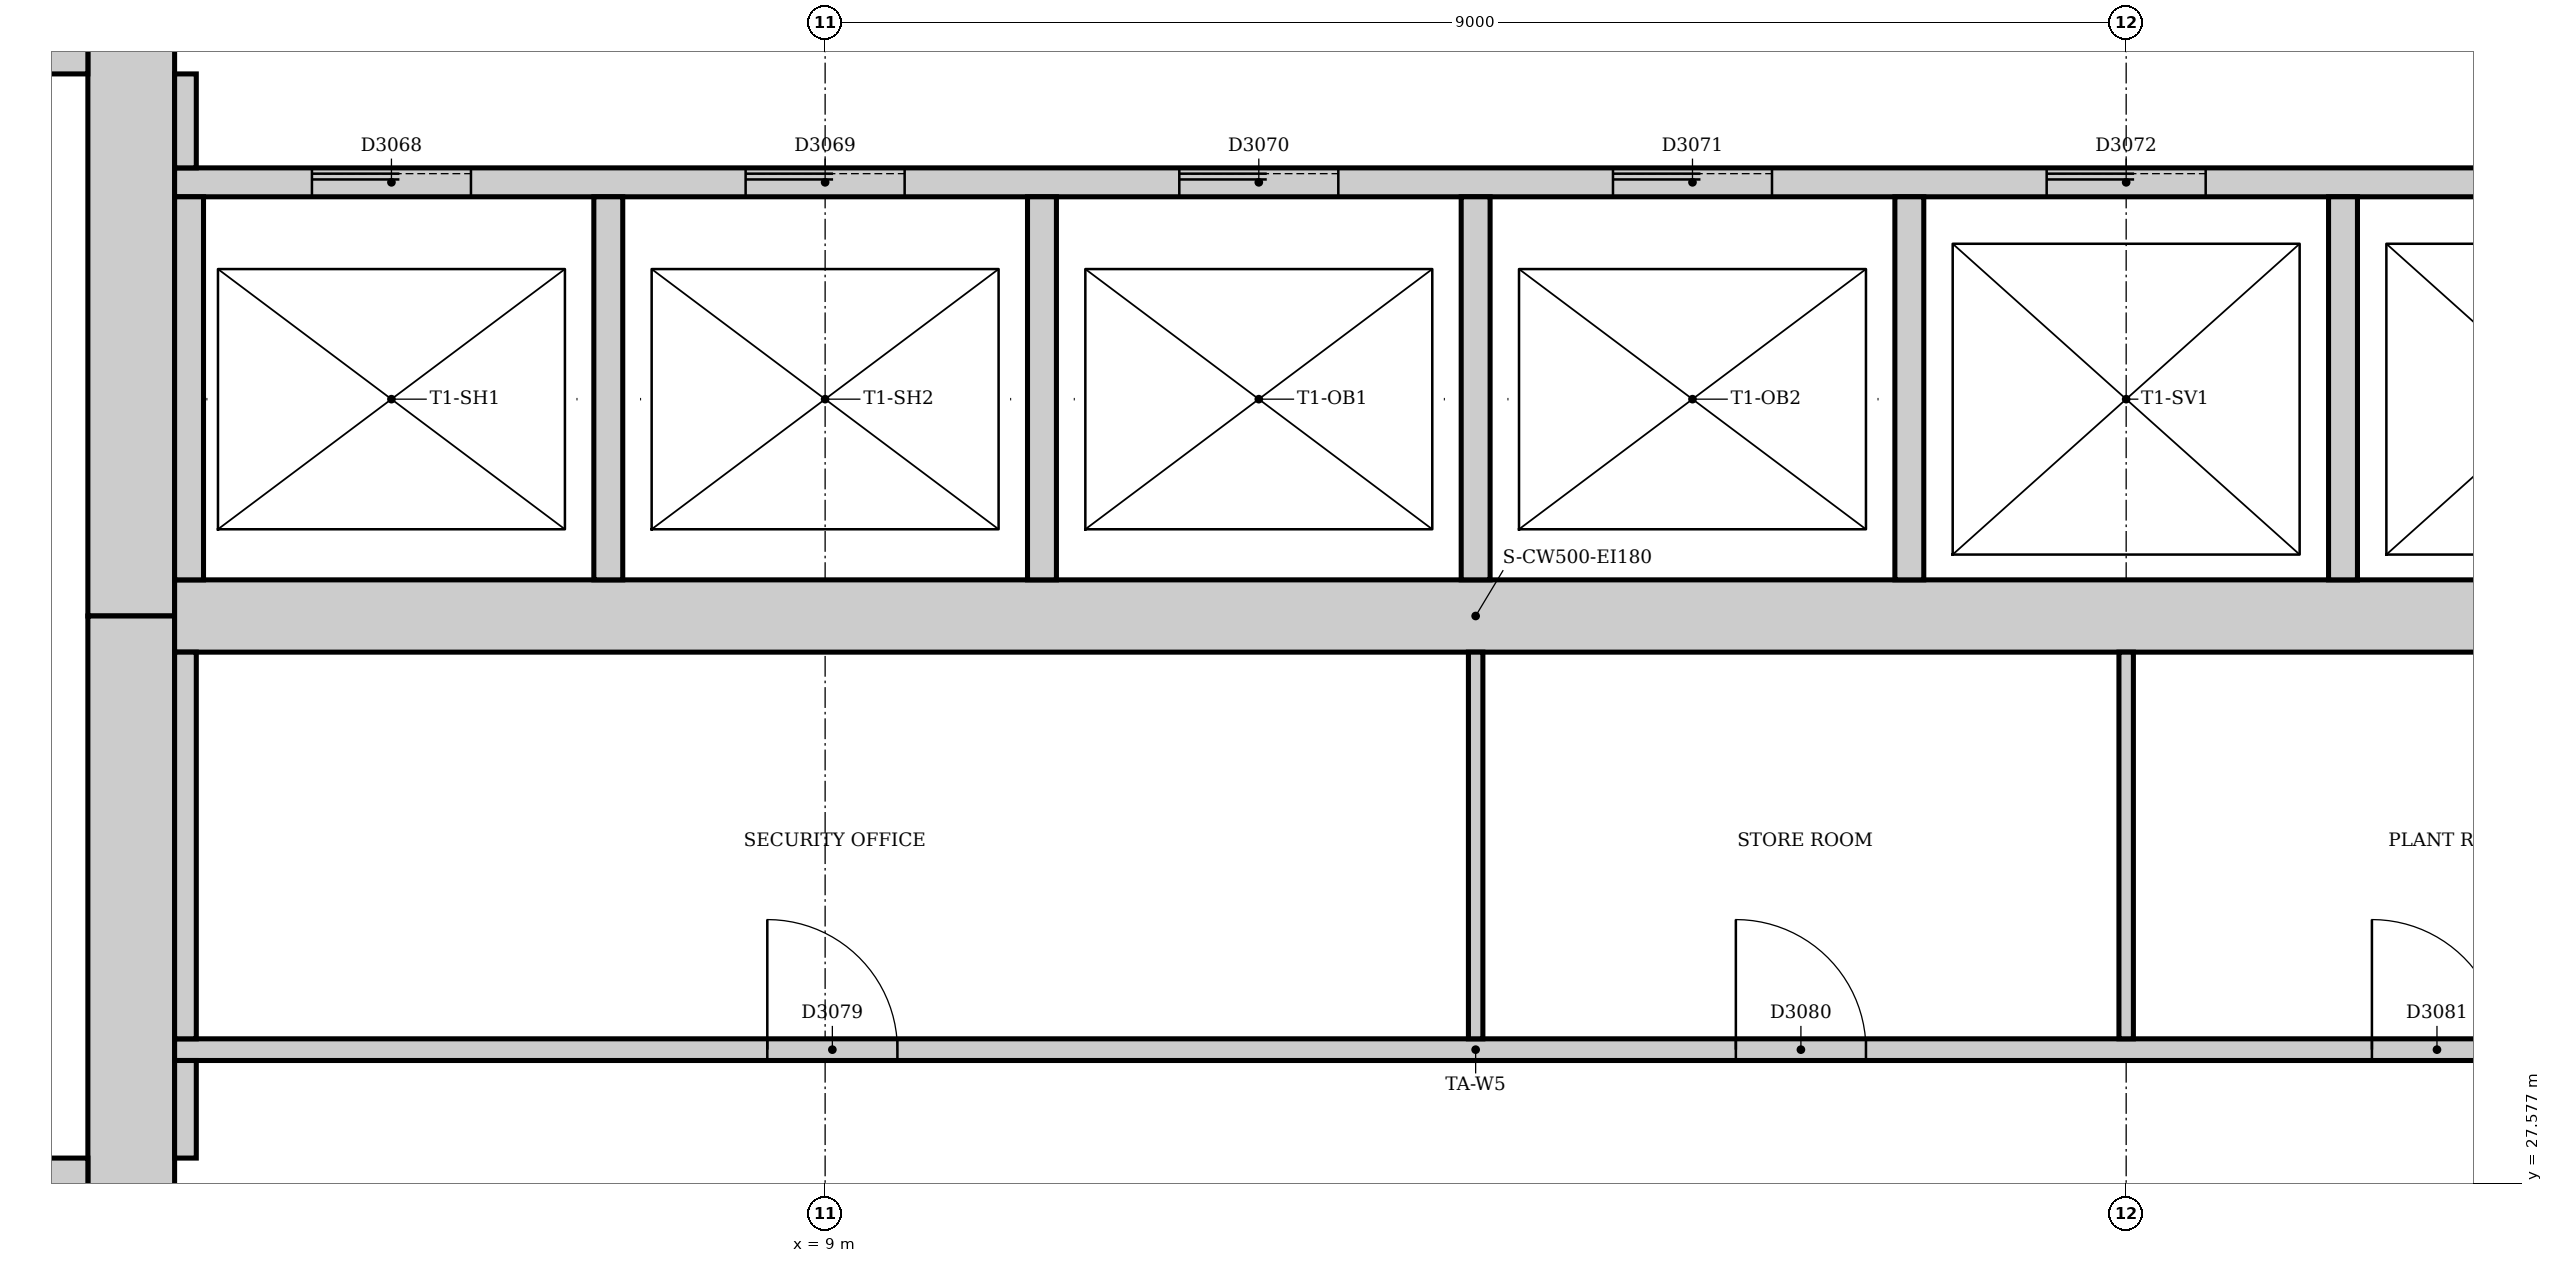
"""IFC4 building model, lengths in metres.
Left out: names, types, materials, properties, quantities, classifications, styles, units other than length and angle.
Written with IfcOpenShell. Run it as: python <this file> out.ifc"""

import sys

from ifc_helpers import new_model, si_unit, direction, frame, frame_2d, origin, place, context, subcontext, project, spatial, rectangle, extrude, element, fill, save


model = new_model("IFC4")
c1 = context("Model", 3, precision=1e-05, world=origin(), true_north=direction((0.0, 1.0)))
c2 = subcontext(c1, "Body", "Model", "MODEL_VIEW")
j1 = project(units=[si_unit("LENGTHUNIT", "METRE"), si_unit("PLANEANGLEUNIT", "RADIAN")], contexts=[c1])
p1 = place(None, origin())
s1 = spatial("IfcSite", under=j1, at=p1, CompositionType="ELEMENT")
p2 = place(p1, origin())
s2 = spatial("IfcBuilding", under=s1, at=p2, CompositionType="ELEMENT")
p3 = place(p2, origin())
s3 = spatial("IfcBuildingStorey", under=s2, at=p3, CompositionType="ELEMENT", Elevation=0.0)
p4 = place(p3, frame((4.2, 42.0, 0.0), z_axis=(0.0, 0.0, 1.0), x_axis=(0.0, -1.0, 0.0)))
e1 = element("IfcWall", 1, at=p4, inside=s3, PredefinedType="SOLIDWALL", context=c2, shape_type="SweptSolid", body=[
    extrude(rectangle(XDim=10.5, YDim=0.6, at=frame_2d((5.25, 0.0))), origin(), (0.0, 0.0, 1.0), 6.0),
])
p5 = place(p4, frame((5.3, 0.0, 0.0)))
e2 = element("IfcOpeningElement", 2, at=p5, cuts=e1, PredefinedType="OPENING", context=c2, shape_type="SweptSolid", body=[
    extrude(rectangle(XDim=1.0, YDim=2.1, at=frame_2d((0.5, 1.05))), frame((0.0, 0.31, 0.0), z_axis=(0.0, -1.0, 0.0), x_axis=(1.0, 0.0, 0.0)), (0.0, 0.0, 1.0), 0.62),
])
p6 = place(p3, frame((4.2, 31.5, 0.0), z_axis=(0.0, 0.0, 1.0), x_axis=(0.0, -1.0, 0.0)))
e3 = element("IfcWall", 3, at=p6, inside=s3, PredefinedType="SOLIDWALL", context=c2, shape_type="SweptSolid", body=[
    extrude(rectangle(XDim=10.5, YDim=0.6, at=frame_2d((5.25, 0.0))), origin(), (0.0, 0.0, 1.0), 6.0),
])
p7 = place(p6, frame((4.25, 0.0, 0.0)))
e4 = element("IfcOpeningElement", 4, at=p7, cuts=e3, PredefinedType="OPENING", context=c2, shape_type="SweptSolid", body=[
    extrude(rectangle(XDim=1.0, YDim=2.1, at=frame_2d((0.5, 1.05))), frame((0.0, 0.31, 0.0), z_axis=(0.0, -1.0, 0.0), x_axis=(1.0, 0.0, 0.0)), (0.0, 0.0, 1.0), 0.62),
])
p8 = place(p3, frame((4.5, 31.5, 0.0), z_axis=(0.0, 0.0, 1.0), x_axis=(1.0, 0.0, 0.0)))
e5 = element("IfcWall", 5, at=p8, inside=s3, PredefinedType="SOLIDWALL", context=c2, shape_type="SweptSolid", body=[
    extrude(rectangle(XDim=18.0, YDim=0.5, at=frame_2d((9.0, 0.0))), origin(), (0.0, 0.0, 1.0), 6.0),
])
p9 = place(p3, frame((3.9, 27.625, 0.0), z_axis=(0.0, 0.0, 1.0), x_axis=(-1.0, 0.0, 0.0)))
e6 = element("IfcWall", 6, at=p9, inside=s3, PredefinedType="SOLIDWALL", context=c2, shape_type="SweptSolid", body=[
    extrude(rectangle(XDim=3.54, YDim=0.25, at=frame_2d((1.77, 0.0))), origin(), (0.0, 0.0, 1.0), 6.0),
])
p10 = place(p9, frame((0.4, 0.0, 0.0)))
e7 = element("IfcOpeningElement", 7, at=p10, cuts=e6, PredefinedType="OPENING", context=c2, shape_type="SweptSolid", body=[
    extrude(rectangle(XDim=1.0, YDim=2.1, at=frame_2d((0.5, 1.05))), frame((0.0, 0.135, 0.0), z_axis=(0.0, -1.0, 0.0), x_axis=(1.0, 0.0, 0.0)), (0.0, 0.0, 1.0), 0.27),
])
p11 = place(p3, frame((0.36, 35.375, 0.0), z_axis=(0.0, 0.0, 1.0), x_axis=(1.0, 0.0, 0.0)))
e8 = element("IfcWall", 8, at=p11, inside=s3, PredefinedType="SOLIDWALL", context=c2, shape_type="SweptSolid", body=[
    extrude(rectangle(XDim=3.54, YDim=0.25, at=frame_2d((1.77, 0.0))), origin(), (0.0, 0.0, 1.0), 6.0),
])
p12 = place(p11, frame((2.14, 0.0, 0.0)))
e9 = element("IfcOpeningElement", 9, at=p12, cuts=e8, PredefinedType="OPENING", context=c2, shape_type="SweptSolid", body=[
    extrude(rectangle(XDim=1.0, YDim=2.1, at=frame_2d((0.5, 1.05))), frame((0.0, 0.135, 0.0), z_axis=(0.0, -1.0, 0.0), x_axis=(1.0, 0.0, 0.0)), (0.0, 0.0, 1.0), 0.27),
])
p13 = place(p3, frame((4.5, 34.5, 0.0), z_axis=(0.0, 0.0, 1.0), x_axis=(1.0, 0.0, 0.0)))
e10 = element("IfcWall", 10, at=p13, inside=s3, PredefinedType="PARTITIONING", context=c2, shape_type="SweptSolid", body=[
    extrude(rectangle(XDim=18.0, YDim=0.2, at=frame_2d((9.0, 0.0))), origin(), (0.0, 0.0, 1.0), 5.7),
])
p14 = place(p13, frame((0.95, 0.0, 0.0)))
e11 = element("IfcOpeningElement", 11, at=p14, cuts=e10, PredefinedType="OPENING", context=c2, shape_type="SweptSolid", body=[
    extrude(rectangle(XDim=1.1, YDim=2.1, at=frame_2d((0.55, 1.05))), frame((0.0, 0.11, 0.0), z_axis=(0.0, -1.0, 0.0), x_axis=(1.0, 0.0, 0.0)), (0.0, 0.0, 1.0), 0.22),
])
p15 = place(p13, frame((3.95, 0.0, 0.0)))
e12 = element("IfcOpeningElement", 12, at=p15, cuts=e10, PredefinedType="OPENING", context=c2, shape_type="SweptSolid", body=[
    extrude(rectangle(XDim=1.1, YDim=2.1, at=frame_2d((0.55, 1.05))), frame((0.0, 0.11, 0.0), z_axis=(0.0, -1.0, 0.0), x_axis=(1.0, 0.0, 0.0)), (0.0, 0.0, 1.0), 0.22),
])
p16 = place(p13, frame((6.95, 0.0, 0.0)))
e13 = element("IfcOpeningElement", 13, at=p16, cuts=e10, PredefinedType="OPENING", context=c2, shape_type="SweptSolid", body=[
    extrude(rectangle(XDim=1.1, YDim=2.1, at=frame_2d((0.55, 1.05))), frame((0.0, 0.11, 0.0), z_axis=(0.0, -1.0, 0.0), x_axis=(1.0, 0.0, 0.0)), (0.0, 0.0, 1.0), 0.22),
])
p17 = place(p13, frame((9.95, 0.0, 0.0)))
e14 = element("IfcOpeningElement", 14, at=p17, cuts=e10, PredefinedType="OPENING", context=c2, shape_type="SweptSolid", body=[
    extrude(rectangle(XDim=1.1, YDim=2.1, at=frame_2d((0.55, 1.05))), frame((0.0, 0.11, 0.0), z_axis=(0.0, -1.0, 0.0), x_axis=(1.0, 0.0, 0.0)), (0.0, 0.0, 1.0), 0.22),
])
p18 = place(p13, frame((12.95, 0.0, 0.0)))
e15 = element("IfcOpeningElement", 15, at=p18, cuts=e10, PredefinedType="OPENING", context=c2, shape_type="SweptSolid", body=[
    extrude(rectangle(XDim=1.1, YDim=2.1, at=frame_2d((0.55, 1.05))), frame((0.0, 0.11, 0.0), z_axis=(0.0, -1.0, 0.0), x_axis=(1.0, 0.0, 0.0)), (0.0, 0.0, 1.0), 0.22),
])
p19 = place(p13, frame((15.95, 0.0, 0.0)))
e16 = element("IfcOpeningElement", 16, at=p19, cuts=e10, PredefinedType="OPENING", context=c2, shape_type="SweptSolid", body=[
    extrude(rectangle(XDim=1.1, YDim=2.1, at=frame_2d((0.55, 1.05))), frame((0.0, 0.11, 0.0), z_axis=(0.0, -1.0, 0.0), x_axis=(1.0, 0.0, 0.0)), (0.0, 0.0, 1.0), 0.22),
])
for number, where, z_axis, x_axis in (
    (17, (4.6, 31.75, 0.0), (0.0, 0.0, 1.0), (0.0, 1.0, 0.0)),
    (18, (7.5, 31.75, 0.0), (0.0, 0.0, 1.0), (0.0, 1.0, 0.0)),
    (19, (10.5, 31.75, 0.0), (0.0, 0.0, 1.0), (0.0, 1.0, 0.0)),
    (20, (13.5, 31.75, 0.0), (0.0, 0.0, 1.0), (0.0, 1.0, 0.0)),
    (21, (16.5, 31.75, 0.0), (0.0, 0.0, 1.0), (0.0, 1.0, 0.0)),
    (22, (19.5, 31.75, 0.0), (0.0, 0.0, 1.0), (0.0, 1.0, 0.0)),
):
    element("IfcWall", number, at=place(p3, frame(where, z_axis=z_axis, x_axis=x_axis)), inside=s3, PredefinedType="PARTITIONING", context=c2, shape_type="SweptSolid", body=[
        extrude(rectangle(XDim=2.65, YDim=0.2, at=frame_2d((1.325, 0.0))), origin(), (0.0, 0.0, 1.0), 5.7),
    ])
p20 = place(p3, frame((4.5, 28.5, 0.0), z_axis=(0.0, 0.0, 1.0), x_axis=(1.0, 0.0, 0.0)))
e23 = element("IfcWall", 23, at=p20, inside=s3, PredefinedType="PARTITIONING", context=c2, shape_type="SweptSolid", body=[
    extrude(rectangle(XDim=18.0, YDim=0.15, at=frame_2d((9.0, 0.0))), origin(), (0.0, 0.0, 1.0), 5.7),
])
p21 = place(p20, frame((4.1, 0.0, 0.0)))
e24 = element("IfcOpeningElement", 24, at=p21, cuts=e23, PredefinedType="OPENING", context=c2, shape_type="SweptSolid", body=[
    extrude(rectangle(XDim=0.9, YDim=2.1, at=frame_2d((0.45, 1.05))), frame((0.0, 0.085, 0.0), z_axis=(0.0, -1.0, 0.0), x_axis=(1.0, 0.0, 0.0)), (0.0, 0.0, 1.0), 0.17),
])
p22 = place(p20, frame((10.8, 0.0, 0.0)))
e25 = element("IfcOpeningElement", 25, at=p22, cuts=e23, PredefinedType="OPENING", context=c2, shape_type="SweptSolid", body=[
    extrude(rectangle(XDim=0.9, YDim=2.1, at=frame_2d((0.45, 1.05))), frame((0.0, 0.085, 0.0), z_axis=(0.0, -1.0, 0.0), x_axis=(1.0, 0.0, 0.0)), (0.0, 0.0, 1.0), 0.17),
])
p23 = place(p20, frame((15.2, 0.0, 0.0)))
e26 = element("IfcOpeningElement", 26, at=p23, cuts=e23, PredefinedType="OPENING", context=c2, shape_type="SweptSolid", body=[
    extrude(rectangle(XDim=0.9, YDim=2.1, at=frame_2d((0.45, 1.05))), frame((0.0, 0.085, 0.0), z_axis=(0.0, -1.0, 0.0), x_axis=(1.0, 0.0, 0.0)), (0.0, 0.0, 1.0), 0.17),
])
p24 = place(p3, frame((4.575, 27.75, 0.0), z_axis=(0.0, 0.0, 1.0), x_axis=(0.0, 1.0, 0.0)))
e27 = element("IfcWall", 27, at=p24, inside=s3, PredefinedType="PARTITIONING", context=c2, shape_type="SweptSolid", body=[
    extrude(rectangle(XDim=0.675, YDim=0.15, at=frame_2d((0.338, 0.0))), origin(), (0.0, 0.0, 1.0), 5.7),
])
p25 = place(p3, frame((4.575, 28.575, 0.0), z_axis=(0.0, 0.0, 1.0), x_axis=(0.0, 1.0, 0.0)))
e28 = element("IfcWall", 28, at=p25, inside=s3, PredefinedType="PARTITIONING", context=c2, shape_type="SweptSolid", body=[
    extrude(rectangle(XDim=2.675, YDim=0.15, at=frame_2d((1.337, 0.0))), origin(), (0.0, 0.0, 1.0), 5.7),
])
p26 = place(p3, frame((4.575, 34.6, 0.0), z_axis=(0.0, 0.0, 1.0), x_axis=(0.0, 1.0, 0.0)))
e29 = element("IfcWall", 29, at=p26, inside=s3, PredefinedType="PARTITIONING", context=c2, shape_type="SweptSolid", body=[
    extrude(rectangle(XDim=0.65, YDim=0.15, at=frame_2d((0.325, 0.0))), origin(), (0.0, 0.0, 1.0), 5.7),
])
for number, where, z_axis, x_axis in (
    (30, (13.5, 28.575, 0.0), (0.0, 0.0, 1.0), (0.0, 1.0, 0.0)),
    (31, (18.0, 28.575, 0.0), (0.0, 0.0, 1.0), (0.0, 1.0, 0.0)),
):
    element("IfcWall", number, at=place(p3, frame(where, z_axis=z_axis, x_axis=x_axis)), inside=s3, PredefinedType="PARTITIONING", context=c2, shape_type="SweptSolid", body=[
        extrude(rectangle(XDim=2.675, YDim=0.1, at=frame_2d((1.337, 0.0))), origin(), (0.0, 0.0, 1.0), 5.7),
    ])
p27 = place(p14, origin())
e32 = element("IfcDoor", 32, at=p27, inside=s3, OperationType="SLIDING_TO_LEFT", PredefinedType="DOOR", context=c2, shape_type="SweptSolid", body=[
    extrude(rectangle(XDim=1.1, YDim=2.1, at=frame_2d((0.55, 1.05))), frame((0.0, 0.025, 0.0), z_axis=(0.0, -1.0, 0.0), x_axis=(1.0, 0.0, 0.0)), (0.0, 0.0, 1.0), 0.05),
])
fill(e11, e32)
p28 = place(p15, origin())
e33 = element("IfcDoor", 33, at=p28, inside=s3, OperationType="SLIDING_TO_LEFT", PredefinedType="DOOR", context=c2, shape_type="SweptSolid", body=[
    extrude(rectangle(XDim=1.1, YDim=2.1, at=frame_2d((0.55, 1.05))), frame((0.0, 0.025, 0.0), z_axis=(0.0, -1.0, 0.0), x_axis=(1.0, 0.0, 0.0)), (0.0, 0.0, 1.0), 0.05),
])
fill(e12, e33)
p29 = place(p16, origin())
e34 = element("IfcDoor", 34, at=p29, inside=s3, OperationType="SLIDING_TO_LEFT", PredefinedType="DOOR", context=c2, shape_type="SweptSolid", body=[
    extrude(rectangle(XDim=1.1, YDim=2.1, at=frame_2d((0.55, 1.05))), frame((0.0, 0.025, 0.0), z_axis=(0.0, -1.0, 0.0), x_axis=(1.0, 0.0, 0.0)), (0.0, 0.0, 1.0), 0.05),
])
fill(e13, e34)
p30 = place(p17, origin())
e35 = element("IfcDoor", 35, at=p30, inside=s3, OperationType="SLIDING_TO_LEFT", PredefinedType="DOOR", context=c2, shape_type="SweptSolid", body=[
    extrude(rectangle(XDim=1.1, YDim=2.1, at=frame_2d((0.55, 1.05))), frame((0.0, 0.025, 0.0), z_axis=(0.0, -1.0, 0.0), x_axis=(1.0, 0.0, 0.0)), (0.0, 0.0, 1.0), 0.05),
])
fill(e14, e35)
p31 = place(p18, origin())
e36 = element("IfcDoor", 36, at=p31, inside=s3, OperationType="SLIDING_TO_LEFT", PredefinedType="DOOR", context=c2, shape_type="SweptSolid", body=[
    extrude(rectangle(XDim=1.1, YDim=2.1, at=frame_2d((0.55, 1.05))), frame((0.0, 0.025, 0.0), z_axis=(0.0, -1.0, 0.0), x_axis=(1.0, 0.0, 0.0)), (0.0, 0.0, 1.0), 0.05),
])
fill(e15, e36)
p32 = place(p21, origin())
e37 = element("IfcDoor", 37, at=p32, inside=s3, OperationType="SINGLE_SWING_LEFT", PredefinedType="DOOR", context=c2, shape_type="SweptSolid", body=[
    extrude(rectangle(XDim=0.9, YDim=2.1, at=frame_2d((0.45, 1.05))), frame((0.0, 0.025, 0.0), z_axis=(0.0, -1.0, 0.0), x_axis=(1.0, 0.0, 0.0)), (0.0, 0.0, 1.0), 0.05),
])
fill(e24, e37)
p33 = place(p22, origin())
e38 = element("IfcDoor", 38, at=p33, inside=s3, OperationType="SINGLE_SWING_LEFT", PredefinedType="DOOR", context=c2, shape_type="SweptSolid", body=[
    extrude(rectangle(XDim=0.9, YDim=2.1, at=frame_2d((0.45, 1.05))), frame((0.0, 0.025, 0.0), z_axis=(0.0, -1.0, 0.0), x_axis=(1.0, 0.0, 0.0)), (0.0, 0.0, 1.0), 0.05),
])
fill(e25, e38)
p34 = place(p23, origin())
e39 = element("IfcDoor", 39, at=p34, inside=s3, OperationType="SINGLE_SWING_LEFT", PredefinedType="DOOR", context=c2, shape_type="SweptSolid", body=[
    extrude(rectangle(XDim=0.9, YDim=2.1, at=frame_2d((0.45, 1.05))), frame((0.0, 0.025, 0.0), z_axis=(0.0, -1.0, 0.0), x_axis=(1.0, 0.0, 0.0)), (0.0, 0.0, 1.0), 0.05),
])
fill(e26, e39)
save(model, sys.argv[1])
